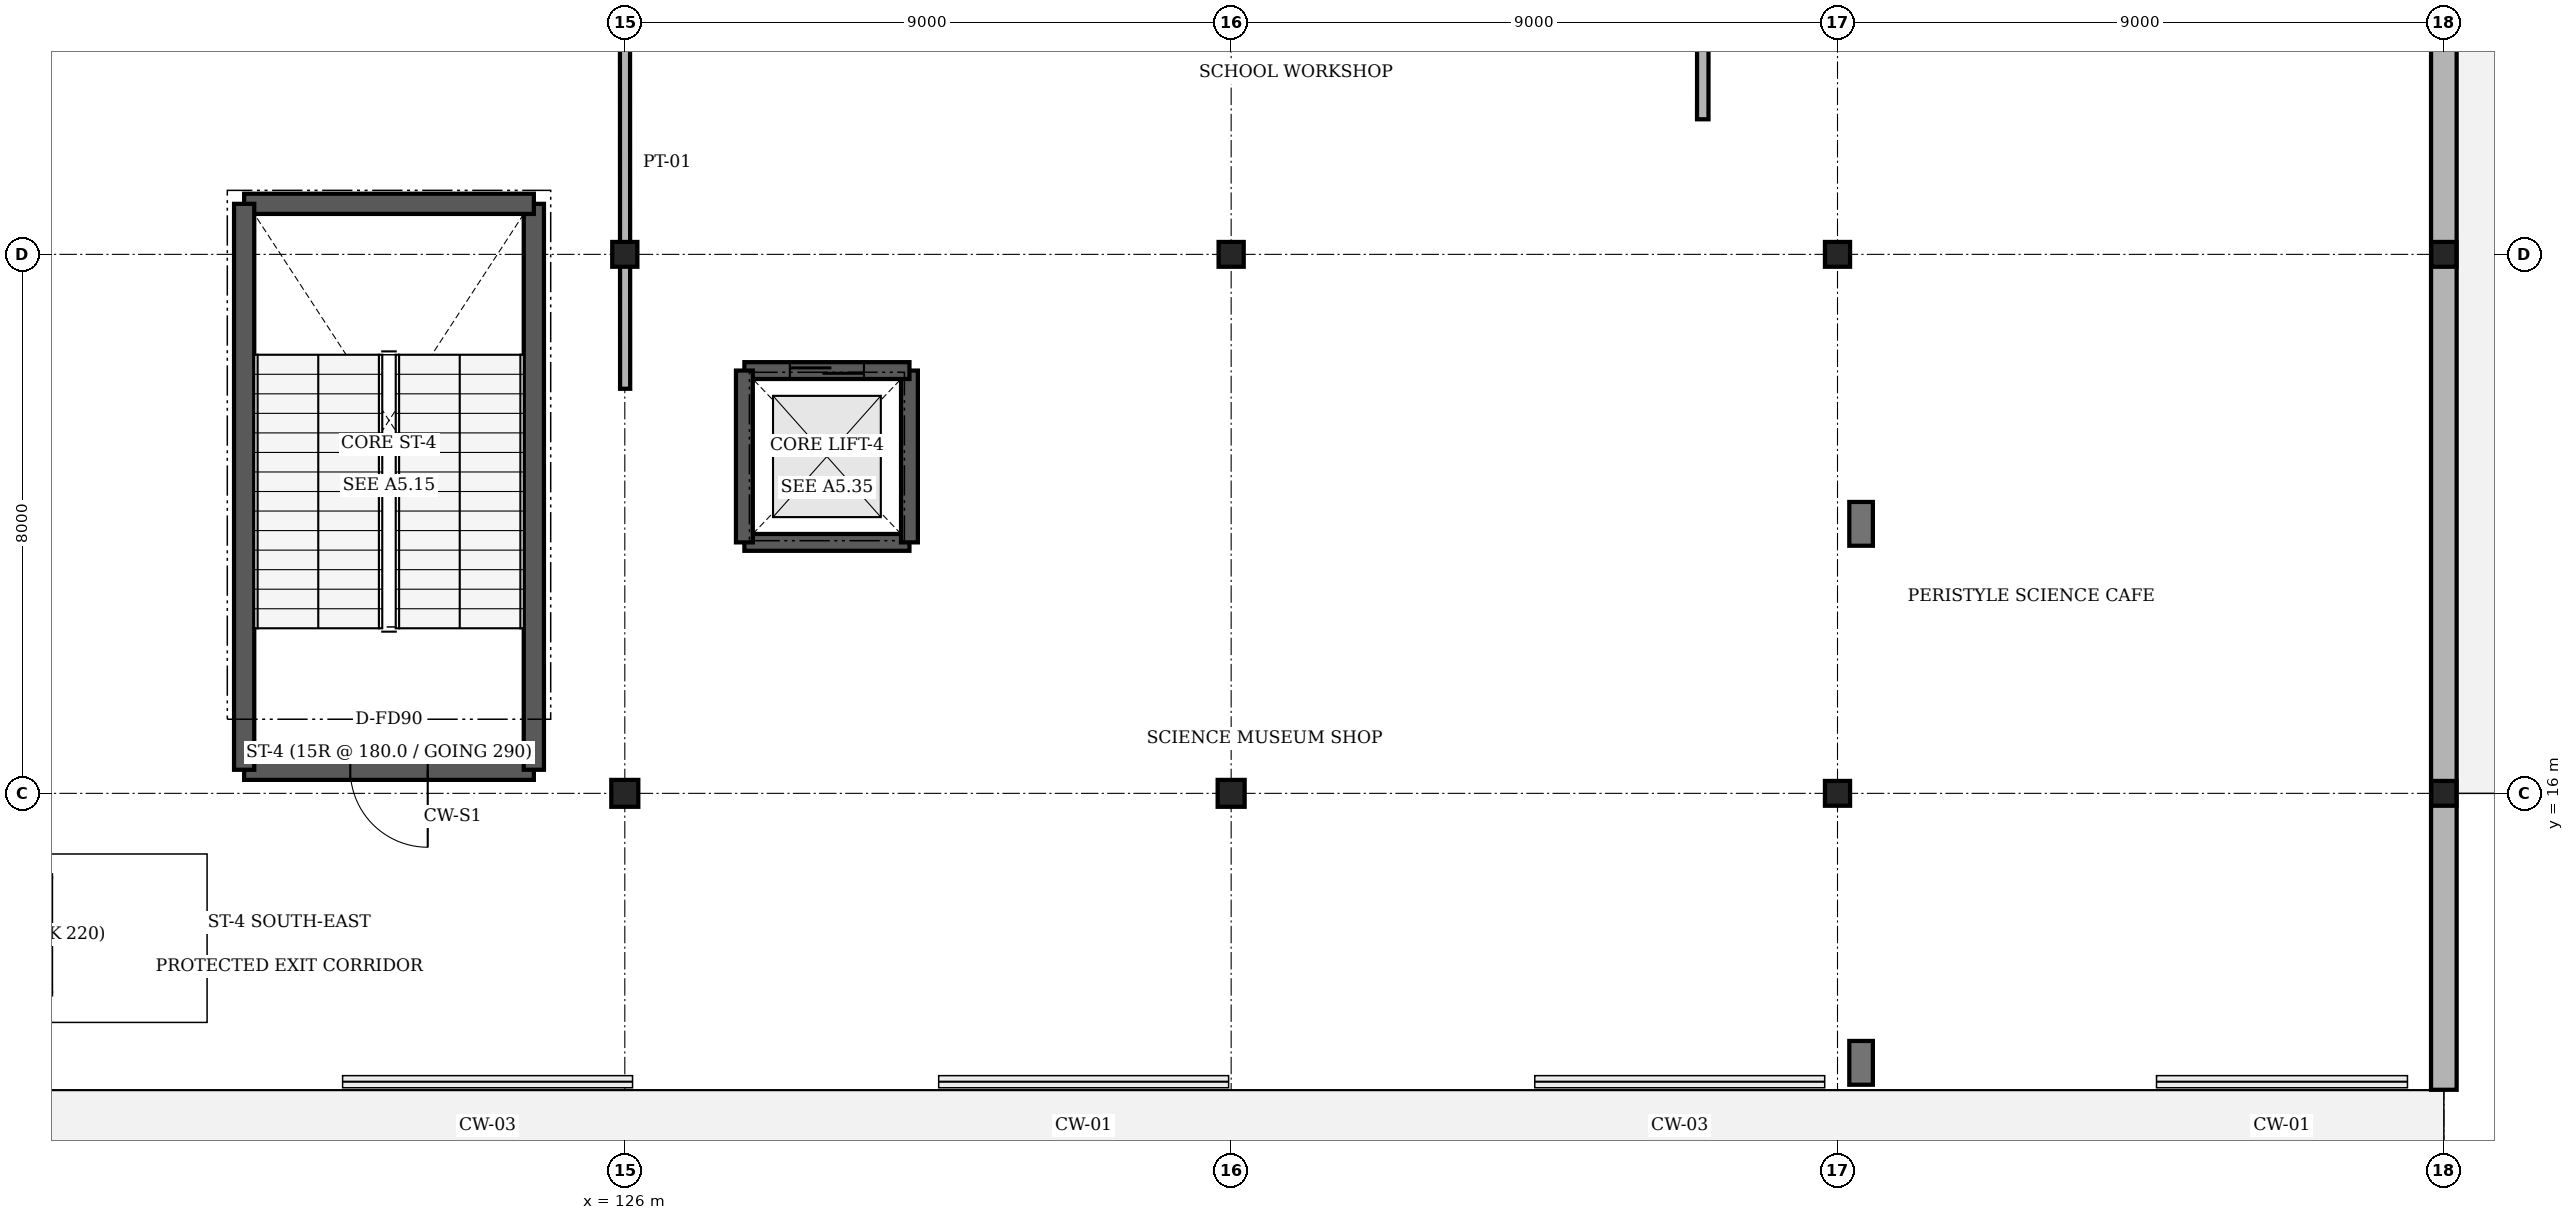
"""IFC4 building model, lengths in metres.
Left out: names, types, materials, properties, quantities, classifications, styles, units other than length and angle.
Written with IfcOpenShell. Run it as: python <this file> out.ifc"""

import sys

from ifc_helpers import new_model, si_unit, direction, frame, frame_2d, origin, origin_2d, place, context, subcontext, project, spatial, rectangle, i_section, extrude, element, fill, save


model = new_model("IFC4")
c1 = context("Model", 3, precision=1e-05, world=origin(), true_north=direction((0.0, 1.0)))
c2 = subcontext(c1, "Body", "Model", "MODEL_VIEW")
j1 = project(units=[si_unit("LENGTHUNIT", "METRE"), si_unit("PLANEANGLEUNIT", "RADIAN")], contexts=[c1])
p1 = place(None, origin())
s1 = spatial("IfcSite", under=j1, at=p1, CompositionType="ELEMENT")
p2 = place(p1, origin())
s2 = spatial("IfcBuilding", under=s1, at=p2, CompositionType="ELEMENT")
p3 = place(p2, origin())
s3 = spatial("IfcBuildingStorey", under=s2, at=p3, CompositionType="ELEMENT", Elevation=0.0)
p4 = place(p3, frame((126.0, 16.0, 0.0), z_axis=(0.0, 0.0, 1.0), x_axis=(1.0, 0.0, 0.0)))
e1 = element("IfcColumn", 1, at=p4, inside=s3, PredefinedType="COLUMN", context=c2, shape_type="SweptSolid", body=[
    extrude(i_section(OverallWidth=0.401, OverallDepth=0.399, WebThickness=0.025, FlangeThickness=0.04, FilletRadius=0.015, at=origin_2d()), origin(), (0.0, 0.0, 1.0), 5.4),
])
p5 = place(p3, frame((126.0, 24.0, 0.0), z_axis=(0.0, 0.0, 1.0), x_axis=(1.0, 0.0, 0.0)))
e2 = element("IfcColumn", 2, at=p5, inside=s3, PredefinedType="COLUMN", context=c2, shape_type="SweptSolid", body=[
    extrude(i_section(OverallWidth=0.373, OverallDepth=0.368, WebThickness=0.015, FlangeThickness=0.024, FilletRadius=0.015, at=origin_2d()), origin(), (0.0, 0.0, 1.0), 5.4),
])
p6 = place(p3, frame((135.0, 16.0, 0.0), z_axis=(0.0, 0.0, 1.0), x_axis=(1.0, 0.0, 0.0)))
e3 = element("IfcColumn", 3, at=p6, inside=s3, PredefinedType="COLUMN", context=c2, shape_type="SweptSolid", body=[
    extrude(i_section(OverallWidth=0.401, OverallDepth=0.399, WebThickness=0.025, FlangeThickness=0.04, FilletRadius=0.015, at=origin_2d()), origin(), (0.0, 0.0, 1.0), 5.4),
])
for number, where, z_axis, x_axis in (
    (4, (135.0, 24.0, 0.0), (0.0, 0.0, 1.0), (1.0, 0.0, 0.0)),
    (5, (144.0, 16.0, 0.0), (0.0, 0.0, 1.0), (1.0, 0.0, 0.0)),
    (6, (144.0, 24.0, 0.0), (0.0, 0.0, 1.0), (1.0, 0.0, 0.0)),
    (7, (153.0, 16.0, 0.0), (0.0, 0.0, 1.0), (1.0, 0.0, 0.0)),
    (8, (153.0, 24.0, 0.0), (0.0, 0.0, 1.0), (1.0, 0.0, 0.0)),
):
    element("IfcColumn", number, at=place(p3, frame(where, z_axis=z_axis, x_axis=x_axis)), inside=s3, PredefinedType="COLUMN", context=c2, shape_type="SweptSolid", body=[
        extrude(i_section(OverallWidth=0.373, OverallDepth=0.368, WebThickness=0.015, FlangeThickness=0.024, FilletRadius=0.015, at=origin_2d()), origin(), (0.0, 0.0, 1.0), 5.4),
    ])
for number, where, z_axis, x_axis in (
    (9, (144.35, 12.0, 0.0), (0.0, 0.0, 1.0), (0.0, 1.0, 0.0)),
    (10, (144.35, 20.0, 0.0), (0.0, 0.0, 1.0), (0.0, 1.0, 0.0)),
):
    element("IfcColumn", number, at=place(p3, frame(where, z_axis=z_axis, x_axis=x_axis)), inside=s3, PredefinedType="PILASTER", context=c2, shape_type="SweptSolid", body=[
        extrude(rectangle(XDim=0.65, YDim=0.35, at=origin_2d()), origin(), (0.0, 0.0, 1.0), 5.4),
    ])
p7 = place(p3, frame((153.0, 56.0, 0.0), z_axis=(0.0, 0.0, 1.0), x_axis=(0.0, -1.0, 0.0)))
e11 = element("IfcWall", 11, at=p7, inside=s3, PredefinedType="SOLIDWALL", context=c2, shape_type="SweptSolid", body=[
    extrude(rectangle(XDim=44.4, YDim=0.38, at=frame_2d((22.2, 0.0))), origin(), (0.0, 0.0, 1.0), 4.166),
])
p8 = place(p7, frame((21.2, 0.0, 0.0)))
e12 = element("IfcOpeningElement", 12, at=p8, cuts=e11, PredefinedType="OPENING", context=c2, shape_type="SweptSolid", body=[
    extrude(rectangle(XDim=2.0, YDim=2.4, at=frame_2d((1.0, 1.2))), frame((0.0, 0.2, 0.0), z_axis=(0.0, -1.0, 0.0), x_axis=(1.0, 0.0, 0.0)), (0.0, 0.0, 1.0), 0.4),
])
p9 = place(p3, frame((124.65, 16.35, 0.0), z_axis=(0.0, 0.0, 1.0), x_axis=(-1.0, 0.0, 0.0)))
e13 = element("IfcWall", 13, at=p9, inside=s3, PredefinedType="SOLIDWALL", context=c2, shape_type="SweptSolid", body=[
    extrude(rectangle(XDim=4.3, YDim=0.3, at=frame_2d((2.15, 0.0))), origin(), (0.0, 0.0, 1.0), 5.4),
])
p10 = place(p9, frame((1.575, 0.0, 0.0)))
e14 = element("IfcOpeningElement", 14, at=p10, cuts=e13, PredefinedType="OPENING", context=c2, shape_type="SweptSolid", body=[
    extrude(rectangle(XDim=1.15, YDim=2.2, at=frame_2d((0.575, 1.1))), frame((0.0, 0.16, 0.0), z_axis=(0.0, -1.0, 0.0), x_axis=(1.0, 0.0, 0.0)), (0.0, 0.0, 1.0), 0.32),
])
p11 = place(p3, frame((124.65, 16.35, 0.0), z_axis=(0.0, 0.0, 1.0), x_axis=(0.0, 1.0, 0.0)))
e15 = element("IfcWall", 15, at=p11, inside=s3, PredefinedType="SOLIDWALL", context=c2, shape_type="SweptSolid", body=[
    extrude(rectangle(XDim=8.4, YDim=0.3, at=frame_2d((4.2, 0.0))), origin(), (0.0, 0.0, 1.0), 5.4),
])
p12 = place(p3, frame((124.65, 24.75, 0.0), z_axis=(0.0, 0.0, 1.0), x_axis=(-1.0, 0.0, 0.0)))
e16 = element("IfcWall", 16, at=p12, inside=s3, PredefinedType="SOLIDWALL", context=c2, shape_type="SweptSolid", body=[
    extrude(rectangle(XDim=4.3, YDim=0.3, at=frame_2d((2.15, 0.0))), origin(), (0.0, 0.0, 1.0), 5.4),
])
p13 = place(p3, frame((120.35, 16.35, 0.0), z_axis=(0.0, 0.0, 1.0), x_axis=(0.0, 1.0, 0.0)))
e17 = element("IfcWall", 17, at=p13, inside=s3, PredefinedType="SOLIDWALL", context=c2, shape_type="SweptSolid", body=[
    extrude(rectangle(XDim=8.4, YDim=0.3, at=frame_2d((4.2, 0.0))), origin(), (0.0, 0.0, 1.0), 5.4),
])
p14 = place(p3, frame((127.775, 19.725, 0.0), z_axis=(0.0, 0.0, 1.0), x_axis=(1.0, 0.0, 0.0)))
e18 = element("IfcWall", 18, at=p14, inside=s3, PredefinedType="SOLIDWALL", context=c2, shape_type="SweptSolid", body=[
    extrude(rectangle(XDim=2.45, YDim=0.25, at=frame_2d((1.225, 0.0))), origin(), (0.0, 0.0, 1.0), 5.4),
])
p15 = place(p3, frame((130.225, 19.725, 0.0), z_axis=(0.0, 0.0, 1.0), x_axis=(0.0, 1.0, 0.0)))
e19 = element("IfcWall", 19, at=p15, inside=s3, PredefinedType="SOLIDWALL", context=c2, shape_type="SweptSolid", body=[
    extrude(rectangle(XDim=2.55, YDim=0.25, at=frame_2d((1.275, 0.0))), origin(), (0.0, 0.0, 1.0), 5.4),
])
p16 = place(p3, frame((130.225, 22.275, 0.0), z_axis=(0.0, 0.0, 1.0), x_axis=(-1.0, 0.0, 0.0)))
e20 = element("IfcWall", 20, at=p16, inside=s3, PredefinedType="SOLIDWALL", context=c2, shape_type="SweptSolid", body=[
    extrude(rectangle(XDim=2.45, YDim=0.25, at=frame_2d((1.225, 0.0))), origin(), (0.0, 0.0, 1.0), 5.4),
])
p17 = place(p16, frame((0.675, 0.0, 0.0)))
e21 = element("IfcOpeningElement", 21, at=p17, cuts=e20, PredefinedType="OPENING", context=c2, shape_type="SweptSolid", body=[
    extrude(rectangle(XDim=1.1, YDim=2.2, at=frame_2d((0.55, 1.1))), frame((0.0, 0.135, 0.0), z_axis=(0.0, -1.0, 0.0), x_axis=(1.0, 0.0, 0.0)), (0.0, 0.0, 1.0), 0.27),
])
p18 = place(p3, frame((127.775, 22.275, 0.0), z_axis=(0.0, 0.0, 1.0), x_axis=(0.0, -1.0, 0.0)))
e22 = element("IfcWall", 22, at=p18, inside=s3, PredefinedType="SOLIDWALL", context=c2, shape_type="SweptSolid", body=[
    extrude(rectangle(XDim=2.55, YDim=0.25, at=frame_2d((1.275, 0.0))), origin(), (0.0, 0.0, 1.0), 5.4),
])
p19 = place(p3, frame((126.005, 22.005, 0.0), z_axis=(0.0, 0.0, 1.0), x_axis=(-0.000407232415, 0.999999917081, 0.0)))
e23 = element("IfcWall", 23, at=p19, inside=s3, PredefinedType="PARTITIONING", context=c2, shape_type="SweptSolid", body=[
    extrude(rectangle(XDim=11.99, YDim=0.15, at=frame_2d((5.995, 0.0))), origin(), (0.0, 0.0, 1.0), 3.15),
])
p20 = place(p19, frame((5.145, 0.0, 0.0)))
e24 = element("IfcOpeningElement", 24, at=p20, cuts=e23, PredefinedType="OPENING", context=c2, shape_type="SweptSolid", body=[
    extrude(rectangle(XDim=1.7, YDim=2.3, at=frame_2d((0.85, 1.15))), frame((0.0, 0.085, 0.0), z_axis=(0.0, -1.0, 0.0), x_axis=(1.0, 0.0, 0.0)), (0.0, 0.0, 1.0), 0.17),
])
p21 = place(p3, frame((142.0, 26.005, 0.0), z_axis=(0.0, 0.0, 1.0), x_axis=(0.000465246065, 0.999999891773, 0.0)))
e25 = element("IfcWall", 25, at=p21, inside=s3, PredefinedType="PARTITIONING", context=c2, shape_type="SweptSolid", body=[
    extrude(rectangle(XDim=10.495, YDim=0.17, at=frame_2d((5.248, 0.0))), origin(), (0.0, 0.0, 1.0), 3.15),
])
p22 = place(p21, frame((6.856, 0.0, 0.0)))
e26 = element("IfcOpeningElement", 26, at=p22, cuts=e25, PredefinedType="OPENING", context=c2, shape_type="SweptSolid", body=[
    extrude(rectangle(XDim=1.4, YDim=2.25, at=frame_2d((0.7, 1.125))), frame((0.0, 0.095, 0.0), z_axis=(0.0, -1.0, 0.0), x_axis=(1.0, 0.0, 0.0)), (0.0, 0.0, 1.0), 0.19),
])
p23 = place(p10, origin())
e27 = element("IfcDoor", 27, at=p23, inside=s3, OperationType="SINGLE_SWING_LEFT", PredefinedType="DOOR", context=c2, shape_type="SweptSolid", body=[
    extrude(rectangle(XDim=1.15, YDim=2.2, at=frame_2d((0.575, 1.1))), frame((0.0, 0.025, 0.0), z_axis=(0.0, -1.0, 0.0), x_axis=(1.0, 0.0, 0.0)), (0.0, 0.0, 1.0), 0.05),
])
fill(e14, e27)
p24 = place(p17, origin())
e28 = element("IfcDoor", 28, at=p24, inside=s3, OperationType="SLIDING_TO_LEFT", PredefinedType="DOOR", context=c2, shape_type="SweptSolid", body=[
    extrude(rectangle(XDim=1.1, YDim=2.2, at=frame_2d((0.55, 1.1))), frame((0.0, 0.025, 0.0), z_axis=(0.0, -1.0, 0.0), x_axis=(1.0, 0.0, 0.0)), (0.0, 0.0, 1.0), 0.05),
])
fill(e21, e28)
save(model, sys.argv[1])
